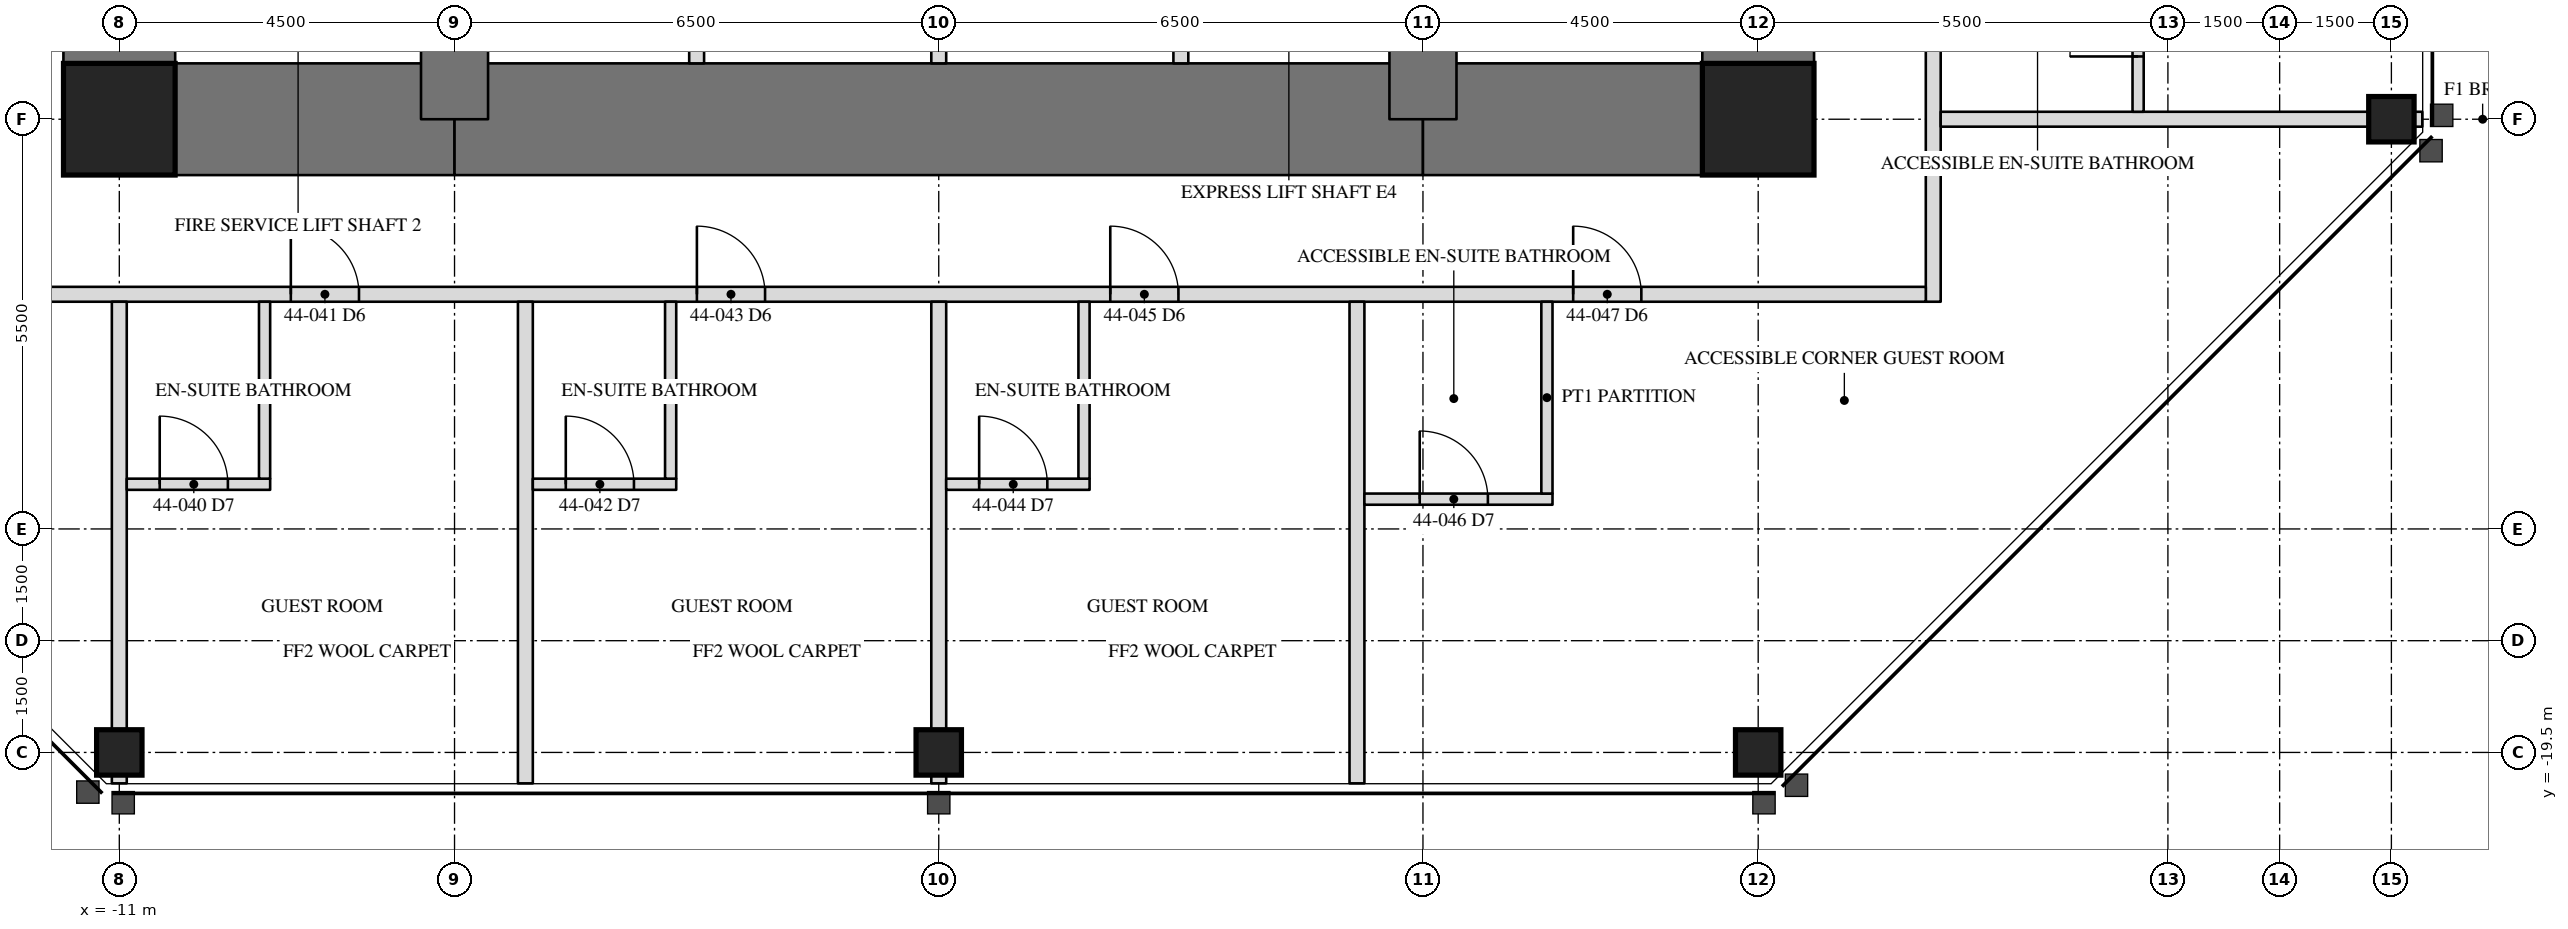
"""IFC4 building model, lengths in metres.
Left out: names, types, materials, properties, quantities, classifications, styles, units other than length and angle.
Written with IfcOpenShell. Run it as: python <this file> out.ifc"""

import sys

from ifc_helpers import new_model, si_unit, direction, frame, frame_2d, origin, origin_2d, place, context, subcontext, project, spatial, rectangle, hollow_rectangle, extrude, element, fill, save


model = new_model("IFC4")
c1 = context("Model", 3, precision=1e-05, world=origin(), true_north=direction((0.0, 1.0)))
c2 = subcontext(c1, "Body", "Model", "MODEL_VIEW")
j1 = project(units=[si_unit("LENGTHUNIT", "METRE"), si_unit("PLANEANGLEUNIT", "RADIAN")], contexts=[c1])
p1 = place(None, origin())
s1 = spatial("IfcSite", under=j1, at=p1, CompositionType="ELEMENT")
p2 = place(p1, origin())
s2 = spatial("IfcBuilding", under=s1, at=p2, CompositionType="ELEMENT")
p3 = place(p2, frame((0.0, 0.0, 190.7)))
s3 = spatial("IfcBuildingStorey", under=s2, at=p3, CompositionType="ELEMENT", Elevation=190.7)
for number, where, z_axis, x_axis in (
    (1, (-11.0, -19.5, 0.0), (0.0, 0.0, 1.0), (1.0, 0.0, 0.0)),
    (2, (0.0, -19.5, 0.0), (0.0, 0.0, 1.0), (1.0, 0.0, 0.0)),
    (3, (11.0, -19.5, 0.0), (0.0, 0.0, 1.0), (1.0, 0.0, 0.0)),
    (4, (19.5, -11.0, 0.0), (0.0, 0.0, 1.0), (0.0, 1.0, 0.0)),
):
    element("IfcColumn", number, at=place(p3, frame(where, z_axis=z_axis, x_axis=x_axis)), inside=s3, PredefinedType="COLUMN", context=c2, shape_type="SweptSolid", body=[
        extrude(hollow_rectangle(XDim=0.61, YDim=0.61, WallThickness=0.076, at=origin_2d()), origin(), (0.0, 0.0, 1.0), 3.5),
    ])
p4 = place(p3, frame((11.0, -11.0, 0.0), z_axis=(0.0, 0.0, 1.0), x_axis=(0.0, 1.0, 0.0)))
e5 = element("IfcWall", 5, at=p4, inside=s3, PredefinedType="SHEAR", context=c2, shape_type="SweptSolid", body=[
    extrude(rectangle(XDim=22.0, YDim=1.5, at=frame_2d((11.0, 0.0))), origin(), (0.0, 0.0, 1.0), 3.5),
])
p5 = place(p4, frame((15.393, 0.0, 0.0)))
e6 = element("IfcOpeningElement", 6, at=p5, cuts=e5, PredefinedType="OPENING", context=c2, shape_type="SweptSolid", body=[
    extrude(rectangle(XDim=0.915, YDim=2.134, at=frame_2d((0.458, 1.067))), frame((0.0, 0.76, 0.0), z_axis=(0.0, -1.0, 0.0), x_axis=(1.0, 0.0, 0.0)), (0.0, 0.0, 1.0), 1.52),
])
p6 = place(p3, frame((-11.0, 11.0, 0.0), z_axis=(0.0, 0.0, 1.0), x_axis=(0.0, -1.0, 0.0)))
e7 = element("IfcWall", 7, at=p6, inside=s3, PredefinedType="SHEAR", context=c2, shape_type="SweptSolid", body=[
    extrude(rectangle(XDim=22.0, YDim=1.5, at=frame_2d((11.0, 0.0))), origin(), (0.0, 0.0, 1.0), 3.5),
])
p7 = place(p6, frame((15.393, 0.0, 0.0)))
e8 = element("IfcOpeningElement", 8, at=p7, cuts=e7, PredefinedType="OPENING", context=c2, shape_type="SweptSolid", body=[
    extrude(rectangle(XDim=0.915, YDim=2.134, at=frame_2d((0.458, 1.067))), frame((0.0, 0.76, 0.0), z_axis=(0.0, -1.0, 0.0), x_axis=(1.0, 0.0, 0.0)), (0.0, 0.0, 1.0), 1.52),
])
p8 = place(p3, frame((-11.0, -11.0, 0.0), z_axis=(0.0, 0.0, 1.0), x_axis=(1.0, 0.0, 0.0)))
e9 = element("IfcWall", 9, at=p8, inside=s3, PredefinedType="SHEAR", context=c2, shape_type="SweptSolid", body=[
    extrude(rectangle(XDim=4.5, YDim=1.5, at=frame_2d((2.25, 0.0))), origin(), (0.0, 0.0, 1.0), 3.5),
])
p9 = place(p3, frame((-6.5, -11.0, 0.0), z_axis=(0.0, 0.0, 1.0), x_axis=(1.0, 0.0, 0.0)))
e10 = element("IfcWall", 10, at=p9, inside=s3, PredefinedType="SHEAR", context=c2, shape_type="SweptSolid", body=[
    extrude(rectangle(XDim=13.0, YDim=1.5, at=frame_2d((6.5, 0.0))), origin(), (0.0, 0.0, 1.0), 3.5),
])
p10 = place(p3, frame((6.5, -11.0, 0.0), z_axis=(0.0, 0.0, 1.0), x_axis=(1.0, 0.0, 0.0)))
e11 = element("IfcWall", 11, at=p10, inside=s3, PredefinedType="SHEAR", context=c2, shape_type="SweptSolid", body=[
    extrude(rectangle(XDim=4.5, YDim=1.5, at=frame_2d((2.25, 0.0))), origin(), (0.0, 0.0, 1.0), 3.5),
])
for number, where, z_axis, x_axis in (
    (12, (6.5, -11.0, 0.0), (0.0, 0.0, 1.0), (0.0, 1.0, 0.0)),
    (13, (-6.5, -6.5, 0.0), (0.0, 0.0, 1.0), (0.0, -1.0, 0.0)),
):
    element("IfcWall", number, at=place(p3, frame(where, z_axis=z_axis, x_axis=x_axis)), inside=s3, PredefinedType="SHEAR", context=c2, shape_type="SweptSolid", body=[
        extrude(rectangle(XDim=4.5, YDim=0.9, at=frame_2d((2.25, 0.0))), origin(), (0.0, 0.0, 1.0), 3.5),
    ])
for number, where, z_axis, x_axis in (
    (14, (-11.0, -11.0, 0.0), (0.0, 0.0, 1.0), (1.0, 0.0, 0.0)),
    (15, (11.0, -11.0, 0.0), (0.0, 0.0, 1.0), (1.0, 0.0, 0.0)),
):
    element("IfcColumn", number, at=place(p3, frame(where, z_axis=z_axis, x_axis=x_axis)), inside=s3, PredefinedType="COLUMN", context=c2, shape_type="SweptSolid", body=[
        extrude(hollow_rectangle(XDim=1.499, YDim=1.499, WallThickness=0.102, at=origin_2d()), origin(), (0.0, 0.0, 1.0), 3.5),
    ])
for number, where, z_axis, x_axis in (
    (16, (-3.25, -10.25, 0.0), (0.0, 0.0, 1.0), (0.0, 1.0, 0.0)),
    (17, (0.0, -10.25, 0.0), (0.0, 0.0, 1.0), (0.0, 1.0, 0.0)),
    (18, (3.25, -10.25, 0.0), (0.0, 0.0, 1.0), (0.0, 1.0, 0.0)),
):
    element("IfcWall", number, at=place(p3, frame(where, z_axis=z_axis, x_axis=x_axis)), inside=s3, PredefinedType="PARTITIONING", context=c2, shape_type="SweptSolid", body=[
        extrude(rectangle(XDim=3.3, YDim=0.2, at=frame_2d((1.65, 0.0))), origin(), (0.0, 0.0, 1.0), 3.31),
    ])
p11 = place(p3, frame((13.35, -13.45, 0.0), z_axis=(0.0, 0.0, 1.0), x_axis=(0.0, 1.0, 0.0)))
e19 = element("IfcWall", 19, at=p11, inside=s3, PredefinedType="PARTITIONING", context=c2, shape_type="SweptSolid", body=[
    extrude(rectangle(XDim=26.7, YDim=0.2, at=frame_2d((13.35, 0.0))), origin(), (0.0, 0.0, 1.0), 3.31),
])
p12 = place(p11, frame((5.353, 0.0, 0.0)))
e20 = element("IfcOpeningElement", 20, at=p12, cuts=e19, PredefinedType="OPENING", context=c2, shape_type="SweptSolid", body=[
    extrude(rectangle(XDim=0.915, YDim=2.134, at=frame_2d((0.458, 1.067))), frame((0.0, 0.11, 0.0), z_axis=(0.0, -1.0, 0.0), x_axis=(1.0, 0.0, 0.0)), (0.0, 0.0, 1.0), 0.22),
])
p13 = place(p11, frame((10.204, 0.0, 0.0)))
e21 = element("IfcOpeningElement", 21, at=p13, cuts=e19, PredefinedType="OPENING", context=c2, shape_type="SweptSolid", body=[
    extrude(rectangle(XDim=0.915, YDim=2.134, at=frame_2d((0.458, 1.067))), frame((0.0, 0.11, 0.0), z_axis=(0.0, -1.0, 0.0), x_axis=(1.0, 0.0, 0.0)), (0.0, 0.0, 1.0), 0.22),
])
p14 = place(p11, frame((15.752, 0.0, 0.0)))
e22 = element("IfcOpeningElement", 22, at=p14, cuts=e19, PredefinedType="OPENING", context=c2, shape_type="SweptSolid", body=[
    extrude(rectangle(XDim=0.915, YDim=2.134, at=frame_2d((0.458, 1.067))), frame((0.0, 0.11, 0.0), z_axis=(0.0, -1.0, 0.0), x_axis=(1.0, 0.0, 0.0)), (0.0, 0.0, 1.0), 0.22),
])
p15 = place(p11, frame((21.366, 0.0, 0.0)))
e23 = element("IfcOpeningElement", 23, at=p15, cuts=e19, PredefinedType="OPENING", context=c2, shape_type="SweptSolid", body=[
    extrude(rectangle(XDim=0.915, YDim=2.134, at=frame_2d((0.458, 1.067))), frame((0.0, 0.11, 0.0), z_axis=(0.0, -1.0, 0.0), x_axis=(1.0, 0.0, 0.0)), (0.0, 0.0, 1.0), 0.22),
])
p16 = place(p3, frame((-13.45, -13.35, 0.0), z_axis=(0.0, 0.0, 1.0), x_axis=(1.0, 0.0, 0.0)))
e24 = element("IfcWall", 24, at=p16, inside=s3, PredefinedType="PARTITIONING", context=c2, shape_type="SweptSolid", body=[
    extrude(rectangle(XDim=26.7, YDim=0.2, at=frame_2d((13.35, 0.0))), origin(), (0.0, 0.0, 1.0), 3.31),
])
p17 = place(p16, frame((4.752, 0.0, 0.0)))
e25 = element("IfcOpeningElement", 25, at=p17, cuts=e24, PredefinedType="OPENING", context=c2, shape_type="SweptSolid", body=[
    extrude(rectangle(XDim=0.915, YDim=2.134, at=frame_2d((0.458, 1.067))), frame((0.0, 0.11, 0.0), z_axis=(0.0, -1.0, 0.0), x_axis=(1.0, 0.0, 0.0)), (0.0, 0.0, 1.0), 0.22),
])
p18 = place(p16, frame((10.204, 0.0, 0.0)))
e26 = element("IfcOpeningElement", 26, at=p18, cuts=e24, PredefinedType="OPENING", context=c2, shape_type="SweptSolid", body=[
    extrude(rectangle(XDim=0.915, YDim=2.134, at=frame_2d((0.458, 1.067))), frame((0.0, 0.11, 0.0), z_axis=(0.0, -1.0, 0.0), x_axis=(1.0, 0.0, 0.0)), (0.0, 0.0, 1.0), 0.22),
])
p19 = place(p16, frame((15.752, 0.0, 0.0)))
e27 = element("IfcOpeningElement", 27, at=p19, cuts=e24, PredefinedType="OPENING", context=c2, shape_type="SweptSolid", body=[
    extrude(rectangle(XDim=0.915, YDim=2.134, at=frame_2d((0.458, 1.067))), frame((0.0, 0.11, 0.0), z_axis=(0.0, -1.0, 0.0), x_axis=(1.0, 0.0, 0.0)), (0.0, 0.0, 1.0), 0.22),
])
p20 = place(p16, frame((21.967, 0.0, 0.0)))
e28 = element("IfcOpeningElement", 28, at=p20, cuts=e24, PredefinedType="OPENING", context=c2, shape_type="SweptSolid", body=[
    extrude(rectangle(XDim=0.915, YDim=2.134, at=frame_2d((0.458, 1.067))), frame((0.0, 0.11, 0.0), z_axis=(0.0, -1.0, 0.0), x_axis=(1.0, 0.0, 0.0)), (0.0, 0.0, 1.0), 0.22),
])
p21 = place(p3, frame((13.45, -11.0, 0.0), z_axis=(0.0, 0.0, 1.0), x_axis=(1.0, 0.0, 0.0)))
e29 = element("IfcWall", 29, at=p21, inside=s3, PredefinedType="PARTITIONING", context=c2, shape_type="SweptSolid", body=[
    extrude(rectangle(XDim=6.465, YDim=0.2, at=frame_2d((3.232, 0.0))), origin(), (0.0, 0.0, 1.0), 2.802),
])
p22 = place(p3, frame((16.1, -10.9, 0.0), z_axis=(0.0, 0.0, 1.0), x_axis=(0.0, 1.0, 0.0)))
e30 = element("IfcWall", 30, at=p22, inside=s3, PredefinedType="PARTITIONING", context=c2, shape_type="SweptSolid", body=[
    extrude(rectangle(XDim=2.525, YDim=0.15, at=frame_2d((1.262, 0.0))), origin(), (0.0, 0.0, 1.0), 3.31),
])
p23 = place(p22, frame((0.742, 0.0, 0.0)))
e31 = element("IfcOpeningElement", 31, at=p23, cuts=e30, PredefinedType="OPENING", context=c2, shape_type="SweptSolid", body=[
    extrude(rectangle(XDim=0.915, YDim=2.032, at=frame_2d((0.458, 1.016))), frame((0.0, 0.085, 0.0), z_axis=(0.0, -1.0, 0.0), x_axis=(1.0, 0.0, 0.0)), (0.0, 0.0, 1.0), 0.17),
])
p24 = place(p3, frame((-11.0, -13.45, 0.0), z_axis=(0.0, 0.0, 1.0), x_axis=(0.0, -1.0, 0.0)))
e32 = element("IfcWall", 32, at=p24, inside=s3, PredefinedType="PARTITIONING", context=c2, shape_type="SweptSolid", body=[
    extrude(rectangle(XDim=6.465, YDim=0.2, at=frame_2d((3.232, 0.0))), origin(), (0.0, 0.0, 1.0), 2.802),
])
p25 = place(p3, frame((-5.549, -13.45, 0.0), z_axis=(0.0, 0.0, 1.0), x_axis=(0.0, -1.0, 0.0)))
e33 = element("IfcWall", 33, at=p25, inside=s3, PredefinedType="PARTITIONING", context=c2, shape_type="SweptSolid", body=[
    extrude(rectangle(XDim=6.465, YDim=0.2, at=frame_2d((3.232, 0.0))), origin(), (0.0, 0.0, 1.0), 3.31),
])
p26 = place(p3, frame((0.0, -13.45, 0.0), z_axis=(0.0, 0.0, 1.0), x_axis=(0.0, -1.0, 0.0)))
e34 = element("IfcWall", 34, at=p26, inside=s3, PredefinedType="PARTITIONING", context=c2, shape_type="SweptSolid", body=[
    extrude(rectangle(XDim=6.465, YDim=0.2, at=frame_2d((3.232, 0.0))), origin(), (0.0, 0.0, 1.0), 2.802),
])
p27 = place(p3, frame((5.614, -13.45, 0.0), z_axis=(0.0, 0.0, 1.0), x_axis=(0.0, -1.0, 0.0)))
e35 = element("IfcWall", 35, at=p27, inside=s3, PredefinedType="PARTITIONING", context=c2, shape_type="SweptSolid", body=[
    extrude(rectangle(XDim=6.465, YDim=0.2, at=frame_2d((3.232, 0.0))), origin(), (0.0, 0.0, 1.0), 3.31),
])
p28 = place(p3, frame((-10.9, -15.9, 0.0), z_axis=(0.0, 0.0, 1.0), x_axis=(1.0, 0.0, 0.0)))
e36 = element("IfcWall", 36, at=p28, inside=s3, PredefinedType="PARTITIONING", context=c2, shape_type="SweptSolid", body=[
    extrude(rectangle(XDim=1.925, YDim=0.15, at=frame_2d((0.962, 0.0))), origin(), (0.0, 0.0, 1.0), 3.31),
])
p29 = place(p28, frame((0.442, 0.0, 0.0)))
e37 = element("IfcOpeningElement", 37, at=p29, cuts=e36, PredefinedType="OPENING", context=c2, shape_type="SweptSolid", body=[
    extrude(rectangle(XDim=0.915, YDim=2.032, at=frame_2d((0.458, 1.016))), frame((0.0, 0.085, 0.0), z_axis=(0.0, -1.0, 0.0), x_axis=(1.0, 0.0, 0.0)), (0.0, 0.0, 1.0), 0.17),
])
p30 = place(p3, frame((-9.05, -13.45, 0.0), z_axis=(0.0, 0.0, 1.0), x_axis=(0.0, -1.0, 0.0)))
e38 = element("IfcWall", 38, at=p30, inside=s3, PredefinedType="PARTITIONING", context=c2, shape_type="SweptSolid", body=[
    extrude(rectangle(XDim=2.375, YDim=0.15, at=frame_2d((1.188, 0.0))), origin(), (0.0, 0.0, 1.0), 3.31),
])
p31 = place(p3, frame((-5.449, -15.9, 0.0), z_axis=(0.0, 0.0, 1.0), x_axis=(1.0, 0.0, 0.0)))
e39 = element("IfcWall", 39, at=p31, inside=s3, PredefinedType="PARTITIONING", context=c2, shape_type="SweptSolid", body=[
    extrude(rectangle(XDim=1.925, YDim=0.15, at=frame_2d((0.962, 0.0))), origin(), (0.0, 0.0, 1.0), 3.31),
])
p32 = place(p31, frame((0.442, 0.0, 0.0)))
e40 = element("IfcOpeningElement", 40, at=p32, cuts=e39, PredefinedType="OPENING", context=c2, shape_type="SweptSolid", body=[
    extrude(rectangle(XDim=0.915, YDim=2.032, at=frame_2d((0.458, 1.016))), frame((0.0, 0.085, 0.0), z_axis=(0.0, -1.0, 0.0), x_axis=(1.0, 0.0, 0.0)), (0.0, 0.0, 1.0), 0.17),
])
p33 = place(p3, frame((-3.599, -13.45, 0.0), z_axis=(0.0, 0.0, 1.0), x_axis=(0.0, -1.0, 0.0)))
e41 = element("IfcWall", 41, at=p33, inside=s3, PredefinedType="PARTITIONING", context=c2, shape_type="SweptSolid", body=[
    extrude(rectangle(XDim=2.375, YDim=0.15, at=frame_2d((1.188, 0.0))), origin(), (0.0, 0.0, 1.0), 2.703),
])
p34 = place(p3, frame((0.1, -15.9, 0.0), z_axis=(0.0, 0.0, 1.0), x_axis=(1.0, 0.0, 0.0)))
e42 = element("IfcWall", 42, at=p34, inside=s3, PredefinedType="PARTITIONING", context=c2, shape_type="SweptSolid", body=[
    extrude(rectangle(XDim=1.925, YDim=0.15, at=frame_2d((0.962, 0.0))), origin(), (0.0, 0.0, 1.0), 3.31),
])
p35 = place(p34, frame((0.442, 0.0, 0.0)))
e43 = element("IfcOpeningElement", 43, at=p35, cuts=e42, PredefinedType="OPENING", context=c2, shape_type="SweptSolid", body=[
    extrude(rectangle(XDim=0.915, YDim=2.032, at=frame_2d((0.458, 1.016))), frame((0.0, 0.085, 0.0), z_axis=(0.0, -1.0, 0.0), x_axis=(1.0, 0.0, 0.0)), (0.0, 0.0, 1.0), 0.17),
])
p36 = place(p3, frame((1.95, -13.45, 0.0), z_axis=(0.0, 0.0, 1.0), x_axis=(0.0, -1.0, 0.0)))
e44 = element("IfcWall", 44, at=p36, inside=s3, PredefinedType="PARTITIONING", context=c2, shape_type="SweptSolid", body=[
    extrude(rectangle(XDim=2.375, YDim=0.15, at=frame_2d((1.188, 0.0))), origin(), (0.0, 0.0, 1.0), 3.31),
])
p37 = place(p3, frame((5.714, -16.1, 0.0), z_axis=(0.0, 0.0, 1.0), x_axis=(1.0, 0.0, 0.0)))
e45 = element("IfcWall", 45, at=p37, inside=s3, PredefinedType="PARTITIONING", context=c2, shape_type="SweptSolid", body=[
    extrude(rectangle(XDim=2.525, YDim=0.15, at=frame_2d((1.262, 0.0))), origin(), (0.0, 0.0, 1.0), 3.31),
])
p38 = place(p37, frame((0.742, 0.0, 0.0)))
e46 = element("IfcOpeningElement", 46, at=p38, cuts=e45, PredefinedType="OPENING", context=c2, shape_type="SweptSolid", body=[
    extrude(rectangle(XDim=0.915, YDim=2.032, at=frame_2d((0.458, 1.016))), frame((0.0, 0.085, 0.0), z_axis=(0.0, -1.0, 0.0), x_axis=(1.0, 0.0, 0.0)), (0.0, 0.0, 1.0), 0.17),
])
p39 = place(p3, frame((8.164, -13.45, 0.0), z_axis=(0.0, 0.0, 1.0), x_axis=(0.0, -1.0, 0.0)))
e47 = element("IfcWall", 47, at=p39, inside=s3, PredefinedType="PARTITIONING", context=c2, shape_type="SweptSolid", body=[
    extrude(rectangle(XDim=2.575, YDim=0.15, at=frame_2d((1.288, 0.0))), origin(), (0.0, 0.0, 1.0), 3.31),
])
p40 = place(p23, origin())
e48 = element("IfcDoor", 48, at=p40, inside=s3, OperationType="SINGLE_SWING_LEFT", PredefinedType="DOOR", context=c2, shape_type="SweptSolid", body=[
    extrude(rectangle(XDim=0.915, YDim=2.032, at=frame_2d((0.458, 1.016))), frame((0.0, 0.025, 0.0), z_axis=(0.0, -1.0, 0.0), x_axis=(1.0, 0.0, 0.0)), (0.0, 0.0, 1.0), 0.05),
])
fill(e31, e48)
p41 = place(p29, origin())
e49 = element("IfcDoor", 49, at=p41, inside=s3, OperationType="SINGLE_SWING_LEFT", PredefinedType="DOOR", context=c2, shape_type="SweptSolid", body=[
    extrude(rectangle(XDim=0.915, YDim=2.032, at=frame_2d((0.458, 1.016))), frame((0.0, 0.025, 0.0), z_axis=(0.0, -1.0, 0.0), x_axis=(1.0, 0.0, 0.0)), (0.0, 0.0, 1.0), 0.05),
])
fill(e37, e49)
p42 = place(p17, origin())
e50 = element("IfcDoor", 50, at=p42, inside=s3, OperationType="SINGLE_SWING_LEFT", PredefinedType="DOOR", context=c2, shape_type="SweptSolid", body=[
    extrude(rectangle(XDim=0.915, YDim=2.134, at=frame_2d((0.458, 1.067))), frame((0.0, 0.025, 0.0), z_axis=(0.0, -1.0, 0.0), x_axis=(1.0, 0.0, 0.0)), (0.0, 0.0, 1.0), 0.05),
])
fill(e25, e50)
p43 = place(p32, origin())
e51 = element("IfcDoor", 51, at=p43, inside=s3, OperationType="SINGLE_SWING_LEFT", PredefinedType="DOOR", context=c2, shape_type="SweptSolid", body=[
    extrude(rectangle(XDim=0.915, YDim=2.032, at=frame_2d((0.458, 1.016))), frame((0.0, 0.025, 0.0), z_axis=(0.0, -1.0, 0.0), x_axis=(1.0, 0.0, 0.0)), (0.0, 0.0, 1.0), 0.05),
])
fill(e40, e51)
p44 = place(p18, origin())
e52 = element("IfcDoor", 52, at=p44, inside=s3, OperationType="SINGLE_SWING_LEFT", PredefinedType="DOOR", context=c2, shape_type="SweptSolid", body=[
    extrude(rectangle(XDim=0.915, YDim=2.134, at=frame_2d((0.458, 1.067))), frame((0.0, 0.025, 0.0), z_axis=(0.0, -1.0, 0.0), x_axis=(1.0, 0.0, 0.0)), (0.0, 0.0, 1.0), 0.05),
])
fill(e26, e52)
p45 = place(p35, origin())
e53 = element("IfcDoor", 53, at=p45, inside=s3, OperationType="SINGLE_SWING_LEFT", PredefinedType="DOOR", context=c2, shape_type="SweptSolid", body=[
    extrude(rectangle(XDim=0.915, YDim=2.032, at=frame_2d((0.458, 1.016))), frame((0.0, 0.025, 0.0), z_axis=(0.0, -1.0, 0.0), x_axis=(1.0, 0.0, 0.0)), (0.0, 0.0, 1.0), 0.05),
])
fill(e43, e53)
p46 = place(p19, origin())
e54 = element("IfcDoor", 54, at=p46, inside=s3, OperationType="SINGLE_SWING_LEFT", PredefinedType="DOOR", context=c2, shape_type="SweptSolid", body=[
    extrude(rectangle(XDim=0.915, YDim=2.134, at=frame_2d((0.458, 1.067))), frame((0.0, 0.025, 0.0), z_axis=(0.0, -1.0, 0.0), x_axis=(1.0, 0.0, 0.0)), (0.0, 0.0, 1.0), 0.05),
])
fill(e27, e54)
p47 = place(p38, origin())
e55 = element("IfcDoor", 55, at=p47, inside=s3, OperationType="SINGLE_SWING_LEFT", PredefinedType="DOOR", context=c2, shape_type="SweptSolid", body=[
    extrude(rectangle(XDim=0.915, YDim=2.032, at=frame_2d((0.458, 1.016))), frame((0.0, 0.025, 0.0), z_axis=(0.0, -1.0, 0.0), x_axis=(1.0, 0.0, 0.0)), (0.0, 0.0, 1.0), 0.05),
])
fill(e46, e55)
p48 = place(p20, origin())
e56 = element("IfcDoor", 56, at=p48, inside=s3, OperationType="SINGLE_SWING_LEFT", PredefinedType="DOOR", context=c2, shape_type="SweptSolid", body=[
    extrude(rectangle(XDim=0.915, YDim=2.134, at=frame_2d((0.458, 1.067))), frame((0.0, 0.025, 0.0), z_axis=(0.0, -1.0, 0.0), x_axis=(1.0, 0.0, 0.0)), (0.0, 0.0, 1.0), 0.05),
])
fill(e28, e56)
save(model, sys.argv[1])
